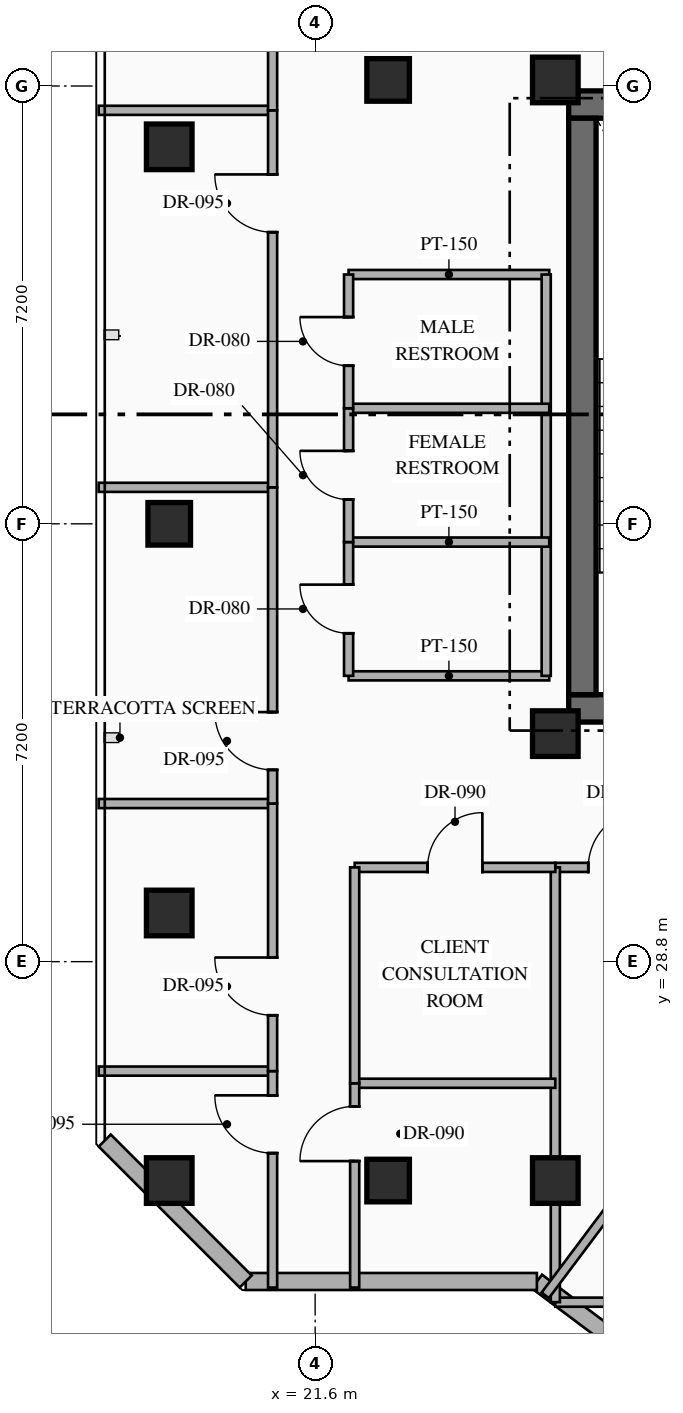
"""IFC4 building model, lengths in metres.
Left out: names, types, materials, properties, quantities, classifications, styles, units other than length and angle.
Written with IfcOpenShell. Run it as: python <this file> out.ifc"""

import sys

from ifc_helpers import new_model, si_unit, direction, frame, frame_2d, origin, origin_2d, place, context, subcontext, project, spatial, rectangle, hollow_rectangle, extrude, element, fill, save


model = new_model("IFC4")
c1 = context("Model", 3, precision=1e-05, world=origin(), true_north=direction((0.0, 1.0)))
c2 = subcontext(c1, "Body", "Model", "MODEL_VIEW")
j1 = project(units=[si_unit("LENGTHUNIT", "METRE"), si_unit("PLANEANGLEUNIT", "RADIAN")], contexts=[c1])
p1 = place(None, origin())
s1 = spatial("IfcSite", under=j1, at=p1, CompositionType="ELEMENT")
p2 = place(p1, origin())
s2 = spatial("IfcBuilding", under=s1, at=p2, CompositionType="ELEMENT")
p3 = place(p2, frame((0.0, 0.0, 209.55)))
s3 = spatial("IfcBuildingStorey", under=s2, at=p3, CompositionType="ELEMENT", Elevation=209.55)
p4 = place(p3, frame((25.77, 32.965, 0.0), z_axis=(0.0, 0.0, 1.0), x_axis=(1.0, 0.0, 0.0)))
e1 = element("IfcWall", 1, at=p4, inside=s3, PredefinedType="SHEAR", context=c2, shape_type="SweptSolid", body=[
    extrude(rectangle(XDim=7.48, YDim=0.45, at=frame_2d((3.74, 0.0))), origin(), (0.0, 0.0, 1.0), 3.6),
])
p5 = place(p4, frame((2.68, 0.0, 0.0)))
e2 = element("IfcOpeningElement", 2, at=p5, cuts=e1, PredefinedType="OPENING", context=c2, shape_type="SweptSolid", body=[
    extrude(rectangle(XDim=1.1, YDim=2.2, at=frame_2d((0.55, 1.1))), frame((0.0, 0.235, 0.0), z_axis=(0.0, -1.0, 0.0), x_axis=(1.0, 0.0, 0.0)), (0.0, 0.0, 1.0), 0.47),
])
p6 = place(p4, frame((5.43, 0.0, 0.0)))
e3 = element("IfcOpeningElement", 3, at=p6, cuts=e1, PredefinedType="OPENING", context=c2, shape_type="SweptSolid", body=[
    extrude(rectangle(XDim=1.1, YDim=2.15, at=frame_2d((0.55, 1.075))), frame((0.0, 0.235, 0.0), z_axis=(0.0, -1.0, 0.0), x_axis=(1.0, 0.0, 0.0)), (0.0, 0.0, 1.0), 0.47),
])
p7 = place(p3, frame((25.77, 42.895, 0.0), z_axis=(0.0, 0.0, 1.0), x_axis=(1.0, 0.0, 0.0)))
e4 = element("IfcWall", 4, at=p7, inside=s3, PredefinedType="SHEAR", context=c2, shape_type="SweptSolid", body=[
    extrude(rectangle(XDim=7.48, YDim=0.45, at=frame_2d((3.74, 0.0))), origin(), (0.0, 0.0, 1.0), 3.6),
])
p8 = place(p3, frame((25.995, 33.19, 0.0), z_axis=(0.0, 0.0, 1.0), x_axis=(0.0, 1.0, 0.0)))
e5 = element("IfcWall", 5, at=p8, inside=s3, PredefinedType="SHEAR", context=c2, shape_type="SweptSolid", body=[
    extrude(rectangle(XDim=9.48, YDim=0.45, at=frame_2d((4.74, 0.0))), origin(), (0.0, 0.0, 1.0), 3.6),
])
for number, where, z_axis, x_axis in (
    (6, (25.55, 32.55, 0.0), (0.0, 0.0, 1.0), (1.0, 0.0, 0.0)),
    (7, (25.55, 43.3, 0.0), (0.0, 0.0, 1.0), (1.0, 0.0, 0.0)),
    (8, (25.55, 25.2, 0.0), (0.0, 0.0, 1.0), (1.0, 0.0, 0.0)),
    (9, (19.2, 25.2, 0.0), (0.0, 0.0, 1.0), (1.0, 0.0, 0.0)),
    (10, (19.2, 29.6, 0.0), (0.0, 0.0, 1.0), (1.0, 0.0, 0.0)),
    (11, (19.2, 42.2, 0.0), (0.0, 0.0, 1.0), (1.0, 0.0, 0.0)),
):
    element("IfcColumn", number, at=place(p3, frame(where, z_axis=z_axis, x_axis=x_axis)), inside=s3, PredefinedType="COLUMN", context=c2, shape_type="SweptSolid", body=[
        extrude(hollow_rectangle(XDim=0.75, YDim=0.75, WallThickness=0.028, at=origin_2d()), origin(), (0.0, 0.0, 1.0), 3.6),
    ])
for number, where, z_axis, x_axis in (
    (12, (22.8, 25.2, 0.0), (0.0, 0.0, 1.0), (1.0, 0.0, 0.0)),
    (13, (22.8, 43.3, 0.0), (0.0, 0.0, 1.0), (1.0, 0.0, 0.0)),
    (14, (19.2, 36.0, 0.0), (0.0, 0.0, 1.0), (1.0, 0.0, 0.0)),
):
    element("IfcColumn", number, at=place(p3, frame(where, z_axis=z_axis, x_axis=x_axis)), inside=s3, PredefinedType="COLUMN", context=c2, shape_type="SweptSolid", body=[
        extrude(hollow_rectangle(XDim=0.7, YDim=0.7, WallThickness=0.028, at=origin_2d()), origin(), (0.0, 0.0, 1.0), 3.6),
    ])
p9 = place(p3, frame((44.918, 8.787, 0.0), z_axis=(0.0, 0.0, 1.0), x_axis=(-0.800004765927, 0.599993645378, 0.0)))
e15 = element("IfcWall", 15, at=p9, inside=s3, PredefinedType="STANDARD", context=c2, shape_type="SweptSolid", body=[
    extrude(rectangle(XDim=24.588, YDim=0.28, at=frame_2d((12.294, 0.0))), origin(), (0.0, 0.0, 1.0), 3.35),
])
p10 = place(p3, frame((25.247, 23.54, 0.0), z_axis=(0.0, 0.0, 1.0), x_axis=(-1.0, 0.0, 0.0)))
e16 = element("IfcWall", 16, at=p10, inside=s3, PredefinedType="STANDARD", context=c2, shape_type="SweptSolid", body=[
    extrude(rectangle(XDim=4.789, YDim=0.28, at=frame_2d((2.395, 0.0))), origin(), (0.0, 0.0, 1.0), 3.35),
])
p11 = place(p3, frame((20.458, 23.54, 0.0), z_axis=(0.0, 0.0, 1.0), x_axis=(-0.707144017911, 0.707069542501, 0.0)))
e17 = element("IfcWall", 17, at=p11, inside=s3, PredefinedType="STANDARD", context=c2, shape_type="SweptSolid", body=[
    extrude(rectangle(XDim=3.278, YDim=0.28, at=frame_2d((1.639, 0.0))), origin(), (0.0, 0.0, 1.0), 3.35),
])
for number, where, z_axis, x_axis in (
    (18, (22.15, 33.5, 0.0), (0.0, 0.0, 1.0), (1.0, 0.0, 0.0)),
    (19, (22.15, 40.1, 0.0), (0.0, 0.0, 1.0), (1.0, 0.0, 0.0)),
):
    element("IfcWall", number, at=place(p3, frame(where, z_axis=z_axis, x_axis=x_axis)), inside=s3, PredefinedType="PARTITIONING", context=c2, shape_type="SweptSolid", body=[
        extrude(rectangle(XDim=3.3, YDim=0.15, at=frame_2d((1.65, 0.0))), origin(), (0.0, 0.0, 1.0), 3.35),
    ])
p12 = place(p3, frame((25.4, 33.5, 0.0), z_axis=(0.0, 0.0, 1.0), x_axis=(0.0, 1.0, 0.0)))
e20 = element("IfcWall", 20, at=p12, inside=s3, PredefinedType="PARTITIONING", context=c2, shape_type="SweptSolid", body=[
    extrude(rectangle(XDim=6.6, YDim=0.15, at=frame_2d((3.3, 0.0))), origin(), (0.0, 0.0, 1.0), 3.35),
])
for number, where, z_axis, x_axis in (
    (21, (22.15, 35.7, 0.0), (0.0, 0.0, 1.0), (1.0, 0.0, 0.0)),
    (22, (22.15, 37.9, 0.0), (0.0, 0.0, 1.0), (1.0, 0.0, 0.0)),
):
    element("IfcWall", number, at=place(p3, frame(where, z_axis=z_axis, x_axis=x_axis)), inside=s3, PredefinedType="PARTITIONING", context=c2, shape_type="SweptSolid", body=[
        extrude(rectangle(XDim=3.3, YDim=0.15, at=frame_2d((1.65, 0.0))), origin(), (0.0, 0.0, 1.0), 3.35),
    ])
p13 = place(p3, frame((22.15, 33.5, 0.0), z_axis=(0.0, 0.0, 1.0), x_axis=(0.0, 1.0, 0.0)))
e23 = element("IfcWall", 23, at=p13, inside=s3, PredefinedType="PARTITIONING", context=c2, shape_type="SweptSolid", body=[
    extrude(rectangle(XDim=2.2, YDim=0.15, at=frame_2d((1.1, 0.0))), origin(), (0.0, 0.0, 1.0), 3.35),
])
p14 = place(p13, frame((0.7, 0.0, 0.0)))
e24 = element("IfcOpeningElement", 24, at=p14, cuts=e23, PredefinedType="OPENING", context=c2, shape_type="SweptSolid", body=[
    extrude(rectangle(XDim=0.8, YDim=2.06, at=frame_2d((0.4, 1.03))), frame((0.0, 0.085, 0.0), z_axis=(0.0, -1.0, 0.0), x_axis=(1.0, 0.0, 0.0)), (0.0, 0.0, 1.0), 0.17),
])
p15 = place(p3, frame((22.15, 35.7, 0.0), z_axis=(0.0, 0.0, 1.0), x_axis=(0.0, 1.0, 0.0)))
e25 = element("IfcWall", 25, at=p15, inside=s3, PredefinedType="PARTITIONING", context=c2, shape_type="SweptSolid", body=[
    extrude(rectangle(XDim=2.2, YDim=0.15, at=frame_2d((1.1, 0.0))), origin(), (0.0, 0.0, 1.0), 3.35),
])
p16 = place(p15, frame((0.7, 0.0, 0.0)))
e26 = element("IfcOpeningElement", 26, at=p16, cuts=e25, PredefinedType="OPENING", context=c2, shape_type="SweptSolid", body=[
    extrude(rectangle(XDim=0.8, YDim=2.06, at=frame_2d((0.4, 1.03))), frame((0.0, 0.085, 0.0), z_axis=(0.0, -1.0, 0.0), x_axis=(1.0, 0.0, 0.0)), (0.0, 0.0, 1.0), 0.17),
])
p17 = place(p3, frame((22.15, 37.9, 0.0), z_axis=(0.0, 0.0, 1.0), x_axis=(0.0, 1.0, 0.0)))
e27 = element("IfcWall", 27, at=p17, inside=s3, PredefinedType="PARTITIONING", context=c2, shape_type="SweptSolid", body=[
    extrude(rectangle(XDim=2.2, YDim=0.15, at=frame_2d((1.1, 0.0))), origin(), (0.0, 0.0, 1.0), 3.35),
])
p18 = place(p17, frame((0.7, 0.0, 0.0)))
e28 = element("IfcOpeningElement", 28, at=p18, cuts=e27, PredefinedType="OPENING", context=c2, shape_type="SweptSolid", body=[
    extrude(rectangle(XDim=0.8, YDim=2.06, at=frame_2d((0.4, 1.03))), frame((0.0, 0.085, 0.0), z_axis=(0.0, -1.0, 0.0), x_axis=(1.0, 0.0, 0.0)), (0.0, 0.0, 1.0), 0.17),
])
p19 = place(p3, frame((25.55, 23.2, 0.0), z_axis=(0.0, 0.0, 1.0), x_axis=(1.0, 0.0, 0.0)))
e29 = element("IfcWall", 29, at=p19, inside=s3, PredefinedType="PARTITIONING", context=c2, shape_type="SweptSolid", body=[
    extrude(rectangle(XDim=4.95, YDim=0.15, at=frame_2d((2.475, 0.0))), origin(), (0.0, 0.0, 1.0), 3.35),
])
p20 = place(p3, frame((25.55, 30.35, 0.0), z_axis=(0.0, 0.0, 1.0), x_axis=(1.0, 0.0, 0.0)))
e30 = element("IfcWall", 30, at=p20, inside=s3, PredefinedType="PARTITIONING", context=c2, shape_type="SweptSolid", body=[
    extrude(rectangle(XDim=4.95, YDim=0.15, at=frame_2d((2.475, 0.0))), origin(), (0.0, 0.0, 1.0), 3.35),
])
p21 = place(p20, frame((0.542, 0.0, 0.0)))
e31 = element("IfcOpeningElement", 31, at=p21, cuts=e30, PredefinedType="OPENING", context=c2, shape_type="SweptSolid", body=[
    extrude(rectangle(XDim=0.95, YDim=2.15, at=frame_2d((0.475, 1.075))), frame((0.0, 0.085, 0.0), z_axis=(0.0, -1.0, 0.0), x_axis=(1.0, 0.0, 0.0)), (0.0, 0.0, 1.0), 0.17),
])
p22 = place(p3, frame((25.55, 23.2, 0.0), z_axis=(0.0, 0.0, 1.0), x_axis=(0.0, 1.0, 0.0)))
e32 = element("IfcWall", 32, at=p22, inside=s3, PredefinedType="PARTITIONING", context=c2, shape_type="SweptSolid", body=[
    extrude(rectangle(XDim=7.15, YDim=0.15, at=frame_2d((3.575, 0.0))), origin(), (0.0, 0.0, 1.0), 2.757),
])
p23 = place(p3, frame((18.04, 27.0, 0.0), z_axis=(0.0, 0.0, 1.0), x_axis=(1.0, 0.0, 0.0)))
e33 = element("IfcWall", 33, at=p23, inside=s3, PredefinedType="PARTITIONING", context=c2, shape_type="SweptSolid", body=[
    extrude(rectangle(XDim=2.86, YDim=0.15, at=frame_2d((1.43, 0.0))), origin(), (0.0, 0.0, 1.0), 3.35),
])
p24 = place(p3, frame((20.9, 23.44, 0.0), z_axis=(0.0, 0.0, 1.0), x_axis=(0.0, 1.0, 0.0)))
e34 = element("IfcWall", 34, at=p24, inside=s3, PredefinedType="PARTITIONING", context=c2, shape_type="SweptSolid", body=[
    extrude(rectangle(XDim=3.56, YDim=0.15, at=frame_2d((1.78, 0.0))), origin(), (0.0, 0.0, 1.0), 3.35),
])
p25 = place(p24, frame((2.211, 0.0, 0.0)))
e35 = element("IfcOpeningElement", 35, at=p25, cuts=e34, PredefinedType="OPENING", context=c2, shape_type="SweptSolid", body=[
    extrude(rectangle(XDim=0.95, YDim=2.15, at=frame_2d((0.475, 1.075))), frame((0.0, 0.085, 0.0), z_axis=(0.0, -1.0, 0.0), x_axis=(1.0, 0.0, 0.0)), (0.0, 0.0, 1.0), 0.17),
])
p26 = place(p3, frame((18.04, 31.4, 0.0), z_axis=(0.0, 0.0, 1.0), x_axis=(1.0, 0.0, 0.0)))
e36 = element("IfcWall", 36, at=p26, inside=s3, PredefinedType="PARTITIONING", context=c2, shape_type="SweptSolid", body=[
    extrude(rectangle(XDim=2.86, YDim=0.15, at=frame_2d((1.43, 0.0))), origin(), (0.0, 0.0, 1.0), 3.35),
])
p27 = place(p3, frame((20.9, 27.0, 0.0), z_axis=(0.0, 0.0, 1.0), x_axis=(0.0, 1.0, 0.0)))
e37 = element("IfcWall", 37, at=p27, inside=s3, PredefinedType="PARTITIONING", context=c2, shape_type="SweptSolid", body=[
    extrude(rectangle(XDim=4.4, YDim=0.15, at=frame_2d((2.2, 0.0))), origin(), (0.0, 0.0, 1.0), 3.35),
])
p28 = place(p27, frame((0.918, 0.0, 0.0)))
e38 = element("IfcOpeningElement", 38, at=p28, cuts=e37, PredefinedType="OPENING", context=c2, shape_type="SweptSolid", body=[
    extrude(rectangle(XDim=0.95, YDim=2.15, at=frame_2d((0.475, 1.075))), frame((0.0, 0.085, 0.0), z_axis=(0.0, -1.0, 0.0), x_axis=(1.0, 0.0, 0.0)), (0.0, 0.0, 1.0), 0.17),
])
p29 = place(p3, frame((18.04, 36.6, 0.0), z_axis=(0.0, 0.0, 1.0), x_axis=(1.0, 0.0, 0.0)))
e39 = element("IfcWall", 39, at=p29, inside=s3, PredefinedType="PARTITIONING", context=c2, shape_type="SweptSolid", body=[
    extrude(rectangle(XDim=2.86, YDim=0.15, at=frame_2d((1.43, 0.0))), origin(), (0.0, 0.0, 1.0), 3.35),
])
p30 = place(p3, frame((20.9, 31.4, 0.0), z_axis=(0.0, 0.0, 1.0), x_axis=(0.0, 1.0, 0.0)))
e40 = element("IfcWall", 40, at=p30, inside=s3, PredefinedType="PARTITIONING", context=c2, shape_type="SweptSolid", body=[
    extrude(rectangle(XDim=5.2, YDim=0.15, at=frame_2d((2.6, 0.0))), origin(), (0.0, 0.0, 1.0), 3.35),
])
p31 = place(p30, frame((0.554, 0.0, 0.0)))
e41 = element("IfcOpeningElement", 41, at=p31, cuts=e40, PredefinedType="OPENING", context=c2, shape_type="SweptSolid", body=[
    extrude(rectangle(XDim=0.95, YDim=2.15, at=frame_2d((0.475, 1.075))), frame((0.0, 0.085, 0.0), z_axis=(0.0, -1.0, 0.0), x_axis=(1.0, 0.0, 0.0)), (0.0, 0.0, 1.0), 0.17),
])
p32 = place(p3, frame((18.04, 42.8, 0.0), z_axis=(0.0, 0.0, 1.0), x_axis=(1.0, 0.0, 0.0)))
e42 = element("IfcWall", 42, at=p32, inside=s3, PredefinedType="PARTITIONING", context=c2, shape_type="SweptSolid", body=[
    extrude(rectangle(XDim=2.86, YDim=0.15, at=frame_2d((1.43, 0.0))), origin(), (0.0, 0.0, 1.0), 3.35),
])
p33 = place(p3, frame((20.9, 36.6, 0.0), z_axis=(0.0, 0.0, 1.0), x_axis=(0.0, 1.0, 0.0)))
e43 = element("IfcWall", 43, at=p33, inside=s3, PredefinedType="PARTITIONING", context=c2, shape_type="SweptSolid", body=[
    extrude(rectangle(XDim=6.2, YDim=0.15, at=frame_2d((3.1, 0.0))), origin(), (0.0, 0.0, 1.0), 3.35),
])
p34 = place(p33, frame((4.196, 0.0, 0.0)))
e44 = element("IfcOpeningElement", 44, at=p34, cuts=e43, PredefinedType="OPENING", context=c2, shape_type="SweptSolid", body=[
    extrude(rectangle(XDim=0.95, YDim=2.15, at=frame_2d((0.475, 1.075))), frame((0.0, 0.085, 0.0), z_axis=(0.0, -1.0, 0.0), x_axis=(1.0, 0.0, 0.0)), (0.0, 0.0, 1.0), 0.17),
])
p35 = place(p3, frame((20.9, 42.8, 0.0), z_axis=(0.0, 0.0, 1.0), x_axis=(0.0, 1.0, 0.0)))
e45 = element("IfcWall", 45, at=p35, inside=s3, PredefinedType="PARTITIONING", context=c2, shape_type="SweptSolid", body=[
    extrude(rectangle(XDim=7.56, YDim=0.15, at=frame_2d((3.78, 0.0))), origin(), (0.0, 0.0, 1.0), 3.35),
])
p36 = place(p35, frame((3.305, 0.0, 0.0)))
e46 = element("IfcOpeningElement", 46, at=p36, cuts=e45, PredefinedType="OPENING", context=c2, shape_type="SweptSolid", body=[
    extrude(rectangle(XDim=0.95, YDim=2.15, at=frame_2d((0.475, 1.075))), frame((0.0, 0.085, 0.0), z_axis=(0.0, -1.0, 0.0), x_axis=(1.0, 0.0, 0.0)), (0.0, 0.0, 1.0), 0.17),
])
p37 = place(p3, frame((22.25, 26.8, 0.0), z_axis=(0.0, 0.0, 1.0), x_axis=(1.0, 0.0, 0.0)))
e47 = element("IfcWall", 47, at=p37, inside=s3, PredefinedType="PARTITIONING", context=c2, shape_type="SweptSolid", body=[
    extrude(rectangle(XDim=3.3, YDim=0.15, at=frame_2d((1.65, 0.0))), origin(), (0.0, 0.0, 1.0), 3.35),
])
p38 = place(p3, frame((22.25, 23.44, 0.0), z_axis=(0.0, 0.0, 1.0), x_axis=(0.0, 1.0, 0.0)))
e48 = element("IfcWall", 48, at=p38, inside=s3, PredefinedType="PARTITIONING", context=c2, shape_type="SweptSolid", body=[
    extrude(rectangle(XDim=3.36, YDim=0.15, at=frame_2d((1.68, 0.0))), origin(), (0.0, 0.0, 1.0), 3.35),
])
p39 = place(p38, frame((2.08, 0.0, 0.0)))
e49 = element("IfcOpeningElement", 49, at=p39, cuts=e48, PredefinedType="OPENING", context=c2, shape_type="SweptSolid", body=[
    extrude(rectangle(XDim=0.9, YDim=2.15, at=frame_2d((0.45, 1.075))), frame((0.0, 0.085, 0.0), z_axis=(0.0, -1.0, 0.0), x_axis=(1.0, 0.0, 0.0)), (0.0, 0.0, 1.0), 0.17),
])
p40 = place(p3, frame((22.25, 30.35, 0.0), z_axis=(0.0, 0.0, 1.0), x_axis=(1.0, 0.0, 0.0)))
e50 = element("IfcWall", 50, at=p40, inside=s3, PredefinedType="PARTITIONING", context=c2, shape_type="SweptSolid", body=[
    extrude(rectangle(XDim=3.3, YDim=0.15, at=frame_2d((1.65, 0.0))), origin(), (0.0, 0.0, 1.0), 3.35),
])
p41 = place(p40, frame((1.2, 0.0, 0.0)))
e51 = element("IfcOpeningElement", 51, at=p41, cuts=e50, PredefinedType="OPENING", context=c2, shape_type="SweptSolid", body=[
    extrude(rectangle(XDim=0.9, YDim=2.15, at=frame_2d((0.45, 1.075))), frame((0.0, 0.085, 0.0), z_axis=(0.0, -1.0, 0.0), x_axis=(1.0, 0.0, 0.0)), (0.0, 0.0, 1.0), 0.17),
])
p42 = place(p3, frame((22.25, 26.8, 0.0), z_axis=(0.0, 0.0, 1.0), x_axis=(0.0, 1.0, 0.0)))
e52 = element("IfcWall", 52, at=p42, inside=s3, PredefinedType="PARTITIONING", context=c2, shape_type="SweptSolid", body=[
    extrude(rectangle(XDim=3.55, YDim=0.15, at=frame_2d((1.775, 0.0))), origin(), (0.0, 0.0, 1.0), 3.35),
])
p43 = place(p3, frame((25.384, 23.312, 0.0), z_axis=(0.0, 0.0, 1.0), x_axis=(0.599990721155, 0.80000695905, 0.0)))
e53 = element("IfcWall", 53, at=p43, inside=s3, PredefinedType="PARTITIONING", context=c2, shape_type="SweptSolid", body=[
    extrude(rectangle(XDim=4.21, YDim=0.15, at=frame_2d((2.105, 0.0))), origin(), (0.0, 0.0, 1.0), 3.35),
])
p44 = place(p14, origin())
e54 = element("IfcDoor", 54, at=p44, inside=s3, OperationType="SINGLE_SWING_RIGHT", PredefinedType="DOOR", context=c2, shape_type="SweptSolid", body=[
    extrude(rectangle(XDim=0.8, YDim=2.06, at=frame_2d((0.4, 1.03))), frame((0.0, 0.025, 0.0), z_axis=(0.0, -1.0, 0.0), x_axis=(1.0, 0.0, 0.0)), (0.0, 0.0, 1.0), 0.05),
])
fill(e24, e54)
p45 = place(p16, origin())
e55 = element("IfcDoor", 55, at=p45, inside=s3, OperationType="SINGLE_SWING_RIGHT", PredefinedType="DOOR", context=c2, shape_type="SweptSolid", body=[
    extrude(rectangle(XDim=0.8, YDim=2.06, at=frame_2d((0.4, 1.03))), frame((0.0, 0.025, 0.0), z_axis=(0.0, -1.0, 0.0), x_axis=(1.0, 0.0, 0.0)), (0.0, 0.0, 1.0), 0.05),
])
fill(e26, e55)
p46 = place(p18, origin())
e56 = element("IfcDoor", 56, at=p46, inside=s3, OperationType="SINGLE_SWING_RIGHT", PredefinedType="DOOR", context=c2, shape_type="SweptSolid", body=[
    extrude(rectangle(XDim=0.8, YDim=2.06, at=frame_2d((0.4, 1.03))), frame((0.0, 0.025, 0.0), z_axis=(0.0, -1.0, 0.0), x_axis=(1.0, 0.0, 0.0)), (0.0, 0.0, 1.0), 0.05),
])
fill(e28, e56)
p47 = place(p21, origin())
e57 = element("IfcDoor", 57, at=p47, inside=s3, OperationType="SINGLE_SWING_RIGHT", PredefinedType="DOOR", context=c2, shape_type="SweptSolid", body=[
    extrude(rectangle(XDim=0.95, YDim=2.15, at=frame_2d((0.475, 1.075))), frame((0.0, 0.025, 0.0), z_axis=(0.0, -1.0, 0.0), x_axis=(1.0, 0.0, 0.0)), (0.0, 0.0, 1.0), 0.05),
])
fill(e31, e57)
p48 = place(p25, origin())
e58 = element("IfcDoor", 58, at=p48, inside=s3, OperationType="SINGLE_SWING_RIGHT", PredefinedType="DOOR", context=c2, shape_type="SweptSolid", body=[
    extrude(rectangle(XDim=0.95, YDim=2.15, at=frame_2d((0.475, 1.075))), frame((0.0, 0.025, 0.0), z_axis=(0.0, -1.0, 0.0), x_axis=(1.0, 0.0, 0.0)), (0.0, 0.0, 1.0), 0.05),
])
fill(e35, e58)
p49 = place(p28, origin())
e59 = element("IfcDoor", 59, at=p49, inside=s3, OperationType="SINGLE_SWING_RIGHT", PredefinedType="DOOR", context=c2, shape_type="SweptSolid", body=[
    extrude(rectangle(XDim=0.95, YDim=2.15, at=frame_2d((0.475, 1.075))), frame((0.0, 0.025, 0.0), z_axis=(0.0, -1.0, 0.0), x_axis=(1.0, 0.0, 0.0)), (0.0, 0.0, 1.0), 0.05),
])
fill(e38, e59)
p50 = place(p31, origin())
e60 = element("IfcDoor", 60, at=p50, inside=s3, OperationType="SINGLE_SWING_RIGHT", PredefinedType="DOOR", context=c2, shape_type="SweptSolid", body=[
    extrude(rectangle(XDim=0.95, YDim=2.15, at=frame_2d((0.475, 1.075))), frame((0.0, 0.025, 0.0), z_axis=(0.0, -1.0, 0.0), x_axis=(1.0, 0.0, 0.0)), (0.0, 0.0, 1.0), 0.05),
])
fill(e41, e60)
p51 = place(p34, origin())
e61 = element("IfcDoor", 61, at=p51, inside=s3, OperationType="SINGLE_SWING_RIGHT", PredefinedType="DOOR", context=c2, shape_type="SweptSolid", body=[
    extrude(rectangle(XDim=0.95, YDim=2.15, at=frame_2d((0.475, 1.075))), frame((0.0, 0.025, 0.0), z_axis=(0.0, -1.0, 0.0), x_axis=(1.0, 0.0, 0.0)), (0.0, 0.0, 1.0), 0.05),
])
fill(e44, e61)
p52 = place(p39, origin())
e62 = element("IfcDoor", 62, at=p52, inside=s3, OperationType="SINGLE_SWING_LEFT", PredefinedType="DOOR", context=c2, shape_type="SweptSolid", body=[
    extrude(rectangle(XDim=0.9, YDim=2.15, at=frame_2d((0.45, 1.075))), frame((0.0, 0.025, 0.0), z_axis=(0.0, -1.0, 0.0), x_axis=(1.0, 0.0, 0.0)), (0.0, 0.0, 1.0), 0.05),
])
fill(e49, e62)
p53 = place(p41, origin())
e63 = element("IfcDoor", 63, at=p53, inside=s3, OperationType="SINGLE_SWING_RIGHT", PredefinedType="DOOR", context=c2, shape_type="SweptSolid", body=[
    extrude(rectangle(XDim=0.9, YDim=2.15, at=frame_2d((0.45, 1.075))), frame((0.0, 0.025, 0.0), z_axis=(0.0, -1.0, 0.0), x_axis=(1.0, 0.0, 0.0)), (0.0, 0.0, 1.0), 0.05),
])
fill(e51, e63)
save(model, sys.argv[1])
